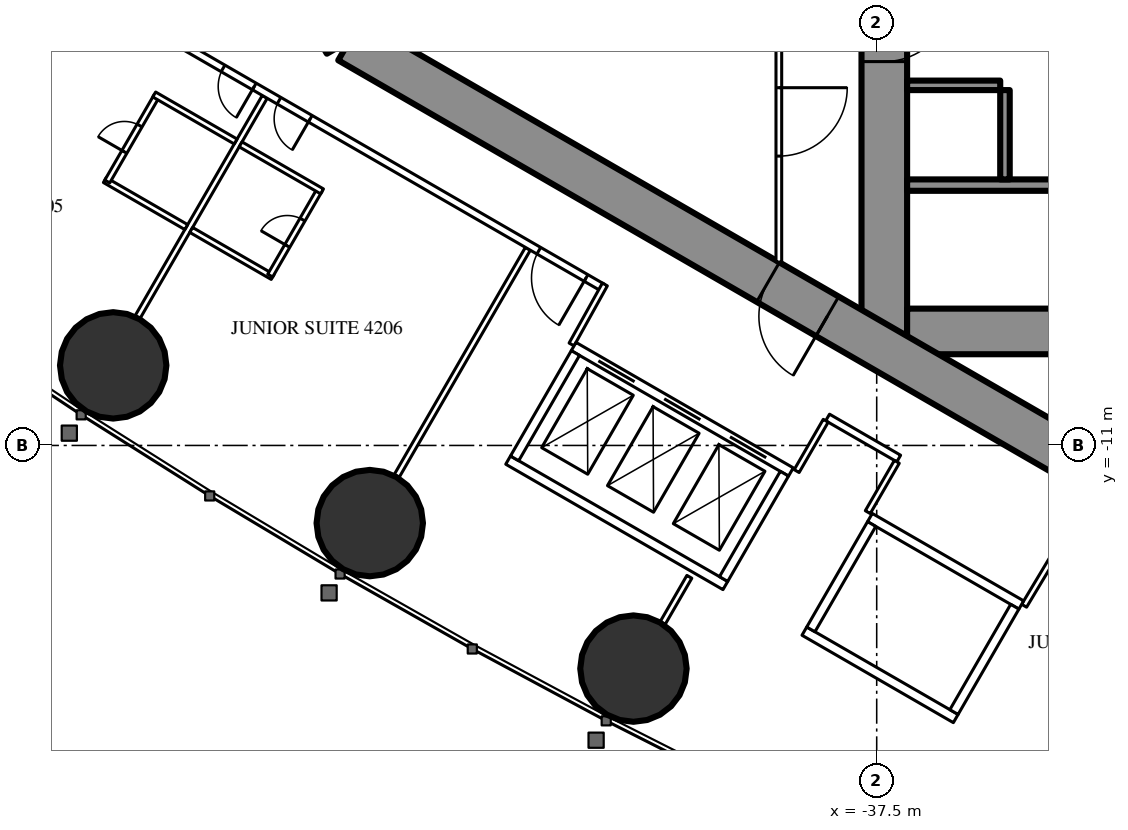
"""IFC4 building model, lengths in metres.
Left out: names, types, materials, properties, quantities, classifications, styles, units other than length and angle.
Written with IfcOpenShell. Run it as: python <this file> out.ifc"""

import sys

from ifc_helpers import new_model, si_unit, direction, frame, frame_2d, origin, origin_2d, place, context, subcontext, project, spatial, rectangle, circle, extrude, element, fill, save


model = new_model("IFC4")
c1 = context("Model", 3, precision=1e-05, world=origin(), true_north=direction((0.0, 1.0)))
c2 = subcontext(c1, "Body", "Model", "MODEL_VIEW")
j1 = project(units=[si_unit("LENGTHUNIT", "METRE"), si_unit("PLANEANGLEUNIT", "RADIAN")], contexts=[c1])
p1 = place(None, origin())
s1 = spatial("IfcSite", under=j1, at=p1, CompositionType="ELEMENT")
p2 = place(p1, origin())
s2 = spatial("IfcBuilding", under=s1, at=p2, CompositionType="ELEMENT")
p3 = place(p2, frame((0.0, 0.0, 159.8)))
s3 = spatial("IfcBuildingStorey", under=s2, at=p3, CompositionType="ELEMENT", Elevation=159.8)
for number, where, z_axis, x_axis in (
    (1, (-57.59, -8.893, 0.0), (0.0, 0.0, 1.0), (1.0, 0.0, 0.0)),
    (2, (-50.839, -13.043, 0.0), (0.0, 0.0, 1.0), (1.0, 0.0, 0.0)),
    (3, (-43.9, -16.871, 0.0), (0.0, 0.0, 1.0), (1.0, 0.0, 0.0)),
):
    element("IfcColumn", number, at=place(p3, frame(where, z_axis=z_axis, x_axis=x_axis)), inside=s3, PredefinedType="COLUMN", context=c2, shape_type="SweptSolid", body=[
        extrude(circle(Radius=1.4, at=origin_2d()), origin(), (0.0, 0.0, 1.0), 3.5),
    ])
p4 = place(p3, frame((-37.3, 8.6, 0.0), z_axis=(0.0, 0.0, 1.0), x_axis=(0.0, -1.0, 0.0)))
e4 = element("IfcWall", 4, at=p4, inside=s3, PredefinedType="SHEAR", context=c2, shape_type="SweptSolid", body=[
    extrude(rectangle(XDim=17.2, YDim=1.2, at=frame_2d((8.6, 0.0))), origin(), (0.0, 0.0, 1.0), 3.5),
])
p5 = place(p4, frame((7.7, 0.0, 0.0)))
e5 = element("IfcOpeningElement", 5, at=p5, cuts=e4, PredefinedType="OPENING", context=c2, shape_type="SweptSolid", body=[
    extrude(rectangle(XDim=1.8, YDim=2.2, at=frame_2d((0.9, 1.1))), frame((0.0, 0.61, 0.0), z_axis=(0.0, -1.0, 0.0), x_axis=(1.0, 0.0, 0.0)), (0.0, 0.0, 1.0), 1.22),
])
p6 = place(p3, frame((-28.3, -8.0, 0.0), z_axis=(0.0, 0.0, 1.0), x_axis=(-1.0, 0.0, 0.0)))
e6 = element("IfcWall", 6, at=p6, inside=s3, PredefinedType="SHEAR", context=c2, shape_type="SweptSolid", body=[
    extrude(rectangle(XDim=8.4, YDim=1.2, at=frame_2d((4.2, 0.0))), origin(), (0.0, 0.0, 1.0), 3.5),
])
p7 = place(p6, frame((0.25, 0.0, 0.0)))
e7 = element("IfcOpeningElement", 7, at=p7, cuts=e6, PredefinedType="OPENING", context=c2, shape_type="SweptSolid", body=[
    extrude(rectangle(XDim=1.0, YDim=2.2, at=frame_2d((0.5, 1.1))), frame((0.0, 0.61, 0.0), z_axis=(0.0, -1.0, 0.0), x_axis=(1.0, 0.0, 0.0)), (0.0, 0.0, 1.0), 1.22),
])
p8 = place(p3, frame((-28.3, -4.15, 0.0), z_axis=(0.0, 0.0, 1.0), x_axis=(-1.0, 0.0, 0.0)))
e8 = element("IfcWall", 8, at=p8, inside=s3, PredefinedType="SHEAR", context=c2, shape_type="SweptSolid", body=[
    extrude(rectangle(XDim=8.4, YDim=0.3, at=frame_2d((4.2, 0.0))), origin(), (0.0, 0.0, 1.0), 3.5),
])
p9 = place(p3, frame((-34.125, -1.65, 0.0), z_axis=(0.0, 0.0, 1.0), x_axis=(0.0, -1.0, 0.0)))
e9 = element("IfcWall", 9, at=p9, inside=s3, PredefinedType="SHEAR", context=c2, shape_type="SweptSolid", body=[
    extrude(rectangle(XDim=2.35, YDim=0.25, at=frame_2d((1.175, 0.0))), origin(), (0.0, 0.0, 1.0), 3.5),
])
p10 = place(p3, frame((-34.25, -1.525, 0.0), z_axis=(0.0, 0.0, 1.0), x_axis=(-1.0, 0.0, 0.0)))
e10 = element("IfcWall", 10, at=p10, inside=s3, PredefinedType="SHEAR", context=c2, shape_type="SweptSolid", body=[
    extrude(rectangle(XDim=2.45, YDim=0.25, at=frame_2d((1.225, 0.0))), origin(), (0.0, 0.0, 1.0), 3.5),
])
p11 = place(p3, frame((-27.2, 14.3, 0.0), z_axis=(0.0, 0.0, 1.0), x_axis=(-0.866026593062, -0.499997940104, 0.0)))
e11 = element("IfcWall", 11, at=p11, inside=s3, PredefinedType="SHEAR", context=c2, shape_type="SweptSolid", body=[
    extrude(rectangle(XDim=28.946, YDim=1.2, at=frame_2d((14.473, 0.0))), origin(), (0.0, 0.0, 1.0), 3.5),
])
p12 = place(p11, frame((4.6, 0.0, 0.0)))
e12 = element("IfcOpeningElement", 12, at=p12, cuts=e11, PredefinedType="OPENING", context=c2, shape_type="SweptSolid", body=[
    extrude(rectangle(XDim=1.0, YDim=2.2, at=frame_2d((0.5, 1.1))), frame((0.0, 0.61, 0.0), z_axis=(0.0, -1.0, 0.0), x_axis=(1.0, 0.0, 0.0)), (0.0, 0.0, 1.0), 1.22),
])
p13 = place(p11, frame((13.395, 0.0, 0.0)))
e13 = element("IfcOpeningElement", 13, at=p13, cuts=e11, PredefinedType="OPENING", context=c2, shape_type="SweptSolid", body=[
    extrude(rectangle(XDim=1.8, YDim=2.2, at=frame_2d((0.9, 1.1))), frame((0.0, 0.61, 0.0), z_axis=(0.0, -1.0, 0.0), x_axis=(1.0, 0.0, 0.0)), (0.0, 0.0, 1.0), 1.22),
])
p14 = place(p3, frame((-27.2, -14.3, 0.0), z_axis=(0.0, 0.0, 1.0), x_axis=(-0.866024021859, 0.500002393557, 0.0)))
e14 = element("IfcWall", 14, at=p14, inside=s3, PredefinedType="SHEAR", context=c2, shape_type="SweptSolid", body=[
    extrude(rectangle(XDim=27.907, YDim=1.2, at=frame_2d((13.954, 0.0))), origin(), (0.0, 0.0, 1.0), 3.5),
])
p15 = place(p14, frame((4.6, 0.0, 0.0)))
e15 = element("IfcOpeningElement", 15, at=p15, cuts=e14, PredefinedType="OPENING", context=c2, shape_type="SweptSolid", body=[
    extrude(rectangle(XDim=1.0, YDim=2.2, at=frame_2d((0.5, 1.1))), frame((0.0, 0.61, 0.0), z_axis=(0.0, -1.0, 0.0), x_axis=(1.0, 0.0, 0.0)), (0.0, 0.0, 1.0), 1.22),
])
p16 = place(p14, frame((13.395, 0.0, 0.0)))
e16 = element("IfcOpeningElement", 16, at=p16, cuts=e14, PredefinedType="OPENING", context=c2, shape_type="SweptSolid", body=[
    extrude(rectangle(XDim=1.8, YDim=2.2, at=frame_2d((0.9, 1.1))), frame((0.0, 0.61, 0.0), z_axis=(0.0, -1.0, 0.0), x_axis=(1.0, 0.0, 0.0)), (0.0, 0.0, 1.0), 1.22),
])
p17 = place(p3, frame((-46.679, -5.825, 0.0), z_axis=(0.0, 0.0, 1.0), x_axis=(-0.500006839597, -0.866021454905, 0.0)))
e17 = element("IfcWall", 17, at=p17, inside=s3, PredefinedType="PARTITIONING", context=c2, shape_type="SweptSolid", body=[
    extrude(rectangle(XDim=6.911, YDim=0.15, at=frame_2d((3.456, 0.0))), origin(), (0.0, 0.0, 1.0), 2.3),
])
p18 = place(p3, frame((-53.602, -1.828, 0.0), z_axis=(0.0, 0.0, 1.0), x_axis=(-0.49999191814, -0.866030069798, 0.0)))
e18 = element("IfcWall", 18, at=p18, inside=s3, PredefinedType="PARTITIONING", context=c2, shape_type="SweptSolid", body=[
    extrude(rectangle(XDim=6.692, YDim=0.15, at=frame_2d((3.346, 0.0))), origin(), (0.0, 0.0, 1.0), 2.3),
])
p19 = place(p3, frame((-42.429, -14.457, 0.0), z_axis=(0.0, 0.0, 1.0), x_axis=(-0.5000578829, -0.865991982497, 0.0)))
e19 = element("IfcWall", 19, at=p19, inside=s3, PredefinedType="PARTITIONING", context=c2, shape_type="SweptSolid", body=[
    extrude(rectangle(XDim=1.407, YDim=0.15, at=frame_2d((0.704, 0.0))), origin(), (0.0, 0.0, 1.0), 3.25),
])
p20 = place(p3, frame((-36.92, -11.344, 0.0), z_axis=(0.0, 0.0, 1.0), x_axis=(-0.866065156741, 0.499931139538, 0.0)))
e20 = element("IfcWall", 20, at=p20, inside=s3, PredefinedType="PARTITIONING", context=c2, shape_type="SweptSolid", body=[
    extrude(rectangle(XDim=2.16, YDim=0.2, at=frame_2d((1.08, 0.0))), origin(), (0.0, 0.0, 1.0), 3.25),
])
p21 = place(p3, frame((-44.715, -6.844, 0.0), z_axis=(0.0, 0.0, 1.0), x_axis=(-0.866025261224, 0.500000246922, 0.0)))
e21 = element("IfcWall", 21, at=p21, inside=s3, PredefinedType="PARTITIONING", context=c2, shape_type="SweptSolid", body=[
    extrude(rectangle(XDim=13.567, YDim=0.2, at=frame_2d((6.783, 0.0))), origin(), (0.0, 0.0, 1.0), 3.25),
])
p22 = place(p21, frame((10.579, 0.0, 0.0)))
e22 = element("IfcOpeningElement", 22, at=p22, cuts=e21, PredefinedType="OPENING", context=c2, shape_type="SweptSolid", body=[
    extrude(rectangle(XDim=0.95, YDim=2.2, at=frame_2d((0.475, 1.1))), frame((0.0, 0.11, 0.0), z_axis=(0.0, -1.0, 0.0), x_axis=(1.0, 0.0, 0.0)), (0.0, 0.0, 1.0), 0.22),
])
p23 = place(p21, frame((8.879, 0.0, 0.0)))
e23 = element("IfcOpeningElement", 23, at=p23, cuts=e21, PredefinedType="OPENING", context=c2, shape_type="SweptSolid", body=[
    extrude(rectangle(XDim=0.95, YDim=2.2, at=frame_2d((0.475, 1.1))), frame((0.0, 0.11, 0.0), z_axis=(0.0, -1.0, 0.0), x_axis=(1.0, 0.0, 0.0)), (0.0, 0.0, 1.0), 0.22),
])
p24 = place(p21, frame((0.5, 0.0, 0.0)))
e24 = element("IfcOpeningElement", 24, at=p24, cuts=e21, PredefinedType="OPENING", context=c2, shape_type="SweptSolid", body=[
    extrude(rectangle(XDim=1.435, YDim=2.2, at=frame_2d((0.718, 1.1))), frame((0.0, 0.11, 0.0), z_axis=(0.0, -1.0, 0.0), x_axis=(1.0, 0.0, 0.0)), (0.0, 0.0, 1.0), 0.22),
])
for number, where, z_axis, x_axis in (
    (25, (-33.621, -15.218, 0.0), (0.0, 0.0, 1.0), (0.514, 0.858, 0.0)),
    (26, (-44.652, -6.764, 0.0), (0.0, 0.0, 1.0), (-0.485, -0.874, 0.0)),
):
    element("IfcWall", number, at=place(p3, frame(where, z_axis=z_axis, x_axis=x_axis)), inside=s3, PredefinedType="PARTITIONING", context=c2, shape_type="SweptSolid", body=[
        extrude(rectangle(XDim=1.805, YDim=0.15, at=frame_2d((0.903, 0.0))), origin(), (0.0, 0.0, 1.0), 3.25),
    ])
p25 = place(p3, frame((-36.97, -11.43, 0.0), z_axis=(0.0, 0.0, 1.0), x_axis=(-0.499985008713, -0.866034058835, 0.0)))
e27 = element("IfcWall", 27, at=p25, inside=s3, PredefinedType="PARTITIONING", context=c2, shape_type="SweptSolid", body=[
    extrude(rectangle(XDim=1.529, YDim=0.15, at=frame_2d((0.765, 0.0))), origin(), (0.0, 0.0, 1.0), 3.25),
])
p26 = place(p3, frame((-38.841, -10.35, 0.0), z_axis=(0.0, 0.0, 1.0), x_axis=(-0.499966498333, -0.866044745117, 0.0)))
e28 = element("IfcWall", 28, at=p26, inside=s3, PredefinedType="PARTITIONING", context=c2, shape_type="SweptSolid", body=[
    extrude(rectangle(XDim=1.53, YDim=0.15, at=frame_2d((0.765, 0.0))), origin(), (0.0, 0.0, 1.0), 3.25),
])
p27 = place(p3, frame((-55.667, -5.255, 0.0), z_axis=(0.0, 0.0, 1.0), x_axis=(-0.866006523861, 0.500032699561, 0.0)))
e29 = element("IfcWall", 29, at=p27, inside=s3, PredefinedType="PARTITIONING", context=c2, shape_type="SweptSolid", body=[
    extrude(rectangle(XDim=2.475, YDim=0.15, at=frame_2d((1.237, 0.0))), origin(), (0.0, 0.0, 1.0), 3.25),
])
p28 = place(p3, frame((-56.446, -1.803, 0.0), z_axis=(0.0, 0.0, 1.0), x_axis=(-0.499936506574, -0.866062058628, 0.0)))
e30 = element("IfcWall", 30, at=p28, inside=s3, PredefinedType="PARTITIONING", context=c2, shape_type="SweptSolid", body=[
    extrude(rectangle(XDim=2.6, YDim=0.15, at=frame_2d((1.3, 0.0))), origin(), (0.0, 0.0, 1.0), 3.25),
])
p29 = place(p28, frame((0.9, 0.0, 0.0)))
e31 = element("IfcOpeningElement", 31, at=p29, cuts=e30, PredefinedType="OPENING", context=c2, shape_type="SweptSolid", body=[
    extrude(rectangle(XDim=0.8, YDim=2.2, at=frame_2d((0.4, 1.1))), frame((0.0, 0.085, 0.0), z_axis=(0.0, -1.0, 0.0), x_axis=(1.0, 0.0, 0.0)), (0.0, 0.0, 1.0), 0.17),
])
for number, where, z_axis, x_axis in (
    (32, (-54.367, -3.003, 0.0), (0.0, 0.0, 1.0), (-0.866, 0.5, 0.0)),
    (33, (-53.394, -6.567, 0.0), (0.0, 0.0, 1.0), (-0.866, 0.5, 0.0)),
):
    element("IfcWall", number, at=place(p3, frame(where, z_axis=z_axis, x_axis=x_axis)), inside=s3, PredefinedType="PARTITIONING", context=c2, shape_type="SweptSolid", body=[
        extrude(rectangle(XDim=2.475, YDim=0.15, at=frame_2d((1.238, 0.0))), origin(), (0.0, 0.0, 1.0), 3.25),
    ])
p30 = place(p3, frame((-52.159, -4.278, 0.0), z_axis=(0.0, 0.0, 1.0), x_axis=(-0.500047596559, -0.865997922154, 0.0)))
e34 = element("IfcWall", 34, at=p30, inside=s3, PredefinedType="PARTITIONING", context=c2, shape_type="SweptSolid", body=[
    extrude(rectangle(XDim=2.6, YDim=0.15, at=frame_2d((1.3, 0.0))), origin(), (0.0, 0.0, 1.0), 3.25),
])
p31 = place(p30, frame((0.9, 0.0, 0.0)))
e35 = element("IfcOpeningElement", 35, at=p31, cuts=e34, PredefinedType="OPENING", context=c2, shape_type="SweptSolid", body=[
    extrude(rectangle(XDim=0.8, YDim=2.2, at=frame_2d((0.4, 1.1))), frame((0.0, 0.085, 0.0), z_axis=(0.0, -1.0, 0.0), x_axis=(1.0, 0.0, 0.0)), (0.0, 0.0, 1.0), 0.17),
])
p32 = place(p3, frame((-52.094, -4.315, 0.0), z_axis=(0.0, 0.0, 1.0), x_axis=(-0.866006523861, 0.500032699561, 0.0)))
e36 = element("IfcWall", 36, at=p32, inside=s3, PredefinedType="PARTITIONING", context=c2, shape_type="SweptSolid", body=[
    extrude(rectangle(XDim=2.475, YDim=0.15, at=frame_2d((1.237, 0.0))), origin(), (0.0, 0.0, 1.0), 2.45),
])
p33 = place(p3, frame((-40.075, 1.2, 0.0), z_axis=(0.0, 0.0, 1.0), x_axis=(0.0, -1.0, 0.0)))
e37 = element("IfcWall", 37, at=p33, inside=s3, PredefinedType="PARTITIONING", context=c2, shape_type="SweptSolid", body=[
    extrude(rectangle(XDim=7.374, YDim=0.15, at=frame_2d((3.687, 0.0))), origin(), (0.0, 0.0, 1.0), 3.25),
])
p34 = place(p33, frame((2.787, 0.0, 0.0)))
e38 = element("IfcOpeningElement", 38, at=p34, cuts=e37, PredefinedType="OPENING", context=c2, shape_type="SweptSolid", body=[
    extrude(rectangle(XDim=1.8, YDim=2.2, at=frame_2d((0.9, 1.1))), frame((0.0, 0.085, 0.0), z_axis=(0.0, -1.0, 0.0), x_axis=(1.0, 0.0, 0.0)), (0.0, 0.0, 1.0), 0.17),
])
p35 = place(p3, frame((-33.696, -15.197, 0.0), z_axis=(0.0, 0.0, 1.0), x_axis=(-0.865976953817, 0.500083908417, 0.0)))
e39 = element("IfcWall", 39, at=p35, inside=s3, PredefinedType="PARTITIONING", context=c2, shape_type="SweptSolid", body=[
    extrude(rectangle(XDim=4.599, YDim=0.25, at=frame_2d((2.3, 0.0))), origin(), (0.0, 0.0, 1.0), 3.25),
])
p36 = place(p3, frame((-35.42, -18.186, 0.0), z_axis=(0.0, 0.0, 1.0), x_axis=(-0.865990227814, 0.50006092162, 0.0)))
e40 = element("IfcWall", 40, at=p36, inside=s3, PredefinedType="PARTITIONING", context=c2, shape_type="SweptSolid", body=[
    extrude(rectangle(XDim=4.6, YDim=0.25, at=frame_2d((2.3, 0.0))), origin(), (0.0, 0.0, 1.0), 3.25),
])
p37 = place(p3, frame((-33.866, -15.243, 0.0), z_axis=(0.0, 0.0, 1.0), x_axis=(-0.499929347863, -0.866066190972, 0.0)))
e41 = element("IfcWall", 41, at=p37, inside=s3, PredefinedType="PARTITIONING", context=c2, shape_type="SweptSolid", body=[
    extrude(rectangle(XDim=3.201, YDim=0.25, at=frame_2d((1.6, 0.0))), origin(), (0.0, 0.0, 1.0), 3.25),
])
p38 = place(p3, frame((-37.633, -13.068, 0.0), z_axis=(0.0, 0.0, 1.0), x_axis=(-0.499872130319, -0.866099216793, 0.0)))
e42 = element("IfcWall", 42, at=p38, inside=s3, PredefinedType="PARTITIONING", context=c2, shape_type="SweptSolid", body=[
    extrude(rectangle(XDim=3.2, YDim=0.25, at=frame_2d((1.6, 0.0))), origin(), (0.0, 0.0, 1.0), 3.25),
])
p39 = place(p3, frame((-39.758, -11.697, 0.0), z_axis=(0.0, 0.0, 1.0), x_axis=(-0.866024194504, 0.500002094529, 0.0)))
e43 = element("IfcWall", 43, at=p39, inside=s3, PredefinedType="PARTITIONING", context=c2, shape_type="SweptSolid", body=[
    extrude(rectangle(XDim=6.6, YDim=0.25, at=frame_2d((3.3, 0.0))), origin(), (0.0, 0.0, 1.0), 3.25),
])
p40 = place(p39, frame((0.75, 0.0, 0.0)))
e44 = element("IfcOpeningElement", 44, at=p40, cuts=e43, PredefinedType="OPENING", context=c2, shape_type="SweptSolid", body=[
    extrude(rectangle(XDim=1.1, YDim=2.2, at=frame_2d((0.55, 1.1))), frame((0.0, 0.135, 0.0), z_axis=(0.0, -1.0, 0.0), x_axis=(1.0, 0.0, 0.0)), (0.0, 0.0, 1.0), 0.27),
])
p41 = place(p39, frame((2.75, 0.0, 0.0)))
e45 = element("IfcOpeningElement", 45, at=p41, cuts=e43, PredefinedType="OPENING", context=c2, shape_type="SweptSolid", body=[
    extrude(rectangle(XDim=1.1, YDim=2.2, at=frame_2d((0.55, 1.1))), frame((0.0, 0.135, 0.0), z_axis=(0.0, -1.0, 0.0), x_axis=(1.0, 0.0, 0.0)), (0.0, 0.0, 1.0), 0.27),
])
p42 = place(p39, frame((4.75, 0.0, 0.0)))
e46 = element("IfcOpeningElement", 46, at=p42, cuts=e43, PredefinedType="OPENING", context=c2, shape_type="SweptSolid", body=[
    extrude(rectangle(XDim=1.1, YDim=2.2, at=frame_2d((0.55, 1.1))), frame((0.0, 0.135, 0.0), z_axis=(0.0, -1.0, 0.0), x_axis=(1.0, 0.0, 0.0)), (0.0, 0.0, 1.0), 0.27),
])
p43 = place(p3, frame((-41.482, -14.686, 0.0), z_axis=(0.0, 0.0, 1.0), x_axis=(-0.86603344179, 0.499986077507, 0.0)))
e47 = element("IfcWall", 47, at=p43, inside=s3, PredefinedType="PARTITIONING", context=c2, shape_type="SweptSolid", body=[
    extrude(rectangle(XDim=6.6, YDim=0.25, at=frame_2d((3.3, 0.0))), origin(), (0.0, 0.0, 1.0), 3.25),
])
for number, where, z_axis, x_axis in (
    (48, (-39.928, -11.743, 0.0), (0.0, 0.0, 1.0), (-0.5, -0.866, 0.0)),
    (49, (-45.428, -8.568, 0.0), (0.0, 0.0, 1.0), (-0.5, -0.866, 0.0)),
):
    element("IfcWall", number, at=place(p3, frame(where, z_axis=z_axis, x_axis=x_axis)), inside=s3, PredefinedType="PARTITIONING", context=c2, shape_type="SweptSolid", body=[
        extrude(rectangle(XDim=3.201, YDim=0.25, at=frame_2d((1.6, 0.0))), origin(), (0.0, 0.0, 1.0), 3.25),
    ])
p44 = place(p29, origin())
e50 = element("IfcDoor", 50, at=p44, inside=s3, OperationType="SINGLE_SWING_RIGHT", PredefinedType="DOOR", context=c2, shape_type="SweptSolid", body=[
    extrude(rectangle(XDim=0.8, YDim=2.2, at=frame_2d((0.4, 1.1))), frame((0.0, 0.025, 0.0), z_axis=(0.0, -1.0, 0.0), x_axis=(1.0, 0.0, 0.0)), (0.0, 0.0, 1.0), 0.05),
])
fill(e31, e50)
p45 = place(p22, origin())
e51 = element("IfcDoor", 51, at=p45, inside=s3, OperationType="SINGLE_SWING_LEFT", PredefinedType="DOOR", context=c2, shape_type="SweptSolid", body=[
    extrude(rectangle(XDim=0.95, YDim=2.2, at=frame_2d((0.475, 1.1))), frame((0.0, 0.025, 0.0), z_axis=(0.0, -1.0, 0.0), x_axis=(1.0, 0.0, 0.0)), (0.0, 0.0, 1.0), 0.05),
])
fill(e22, e51)
p46 = place(p31, origin())
e52 = element("IfcDoor", 52, at=p46, inside=s3, OperationType="SINGLE_SWING_RIGHT", PredefinedType="DOOR", context=c2, shape_type="SweptSolid", body=[
    extrude(rectangle(XDim=0.8, YDim=2.2, at=frame_2d((0.4, 1.1))), frame((0.0, 0.025, 0.0), z_axis=(0.0, -1.0, 0.0), x_axis=(1.0, 0.0, 0.0)), (0.0, 0.0, 1.0), 0.05),
])
fill(e35, e52)
p47 = place(p23, origin())
e53 = element("IfcDoor", 53, at=p47, inside=s3, OperationType="SINGLE_SWING_LEFT", PredefinedType="DOOR", context=c2, shape_type="SweptSolid", body=[
    extrude(rectangle(XDim=0.95, YDim=2.2, at=frame_2d((0.475, 1.1))), frame((0.0, 0.025, 0.0), z_axis=(0.0, -1.0, 0.0), x_axis=(1.0, 0.0, 0.0)), (0.0, 0.0, 1.0), 0.05),
])
fill(e23, e53)
p48 = place(p24, origin())
e54 = element("IfcDoor", 54, at=p48, inside=s3, OperationType="SINGLE_SWING_LEFT", PredefinedType="DOOR", context=c2, shape_type="SweptSolid", body=[
    extrude(rectangle(XDim=1.435, YDim=2.2, at=frame_2d((0.718, 1.1))), frame((0.0, 0.025, 0.0), z_axis=(0.0, -1.0, 0.0), x_axis=(1.0, 0.0, 0.0)), (0.0, 0.0, 1.0), 0.05),
])
fill(e24, e54)
p49 = place(p34, origin())
e55 = element("IfcDoor", 55, at=p49, inside=s3, OperationType="DOUBLE_DOOR_SINGLE_SWING", PredefinedType="DOOR", context=c2, shape_type="SweptSolid", body=[
    extrude(rectangle(XDim=1.8, YDim=2.2, at=frame_2d((0.9, 1.1))), frame((0.0, 0.025, 0.0), z_axis=(0.0, -1.0, 0.0), x_axis=(1.0, 0.0, 0.0)), (0.0, 0.0, 1.0), 0.05),
])
fill(e38, e55)
p50 = place(p16, origin())
e56 = element("IfcDoor", 56, at=p50, inside=s3, OperationType="DOUBLE_DOOR_SINGLE_SWING", PredefinedType="DOOR", context=c2, shape_type="SweptSolid", body=[
    extrude(rectangle(XDim=1.8, YDim=2.2, at=frame_2d((0.9, 1.1))), frame((0.0, 0.025, 0.0), z_axis=(0.0, -1.0, 0.0), x_axis=(1.0, 0.0, 0.0)), (0.0, 0.0, 1.0), 0.05),
])
fill(e16, e56)
p51 = place(p5, origin())
e57 = element("IfcDoor", 57, at=p51, inside=s3, OperationType="DOUBLE_DOOR_SINGLE_SWING", PredefinedType="DOOR", context=c2, shape_type="SweptSolid", body=[
    extrude(rectangle(XDim=1.8, YDim=2.2, at=frame_2d((0.9, 1.1))), frame((0.0, 0.025, 0.0), z_axis=(0.0, -1.0, 0.0), x_axis=(1.0, 0.0, 0.0)), (0.0, 0.0, 1.0), 0.05),
])
fill(e5, e57)
p52 = place(p40, origin())
e58 = element("IfcDoor", 58, at=p52, inside=s3, OperationType="DOUBLE_DOOR_SLIDING", PredefinedType="USERDEFINED", context=c2, shape_type="SweptSolid", body=[
    extrude(rectangle(XDim=1.1, YDim=2.2, at=frame_2d((0.55, 1.1))), frame((0.0, 0.025, 0.0), z_axis=(0.0, -1.0, 0.0), x_axis=(1.0, 0.0, 0.0)), (0.0, 0.0, 1.0), 0.05),
])
fill(e44, e58)
p53 = place(p41, origin())
e59 = element("IfcDoor", 59, at=p53, inside=s3, OperationType="DOUBLE_DOOR_SLIDING", PredefinedType="USERDEFINED", context=c2, shape_type="SweptSolid", body=[
    extrude(rectangle(XDim=1.1, YDim=2.2, at=frame_2d((0.55, 1.1))), frame((0.0, 0.025, 0.0), z_axis=(0.0, -1.0, 0.0), x_axis=(1.0, 0.0, 0.0)), (0.0, 0.0, 1.0), 0.05),
])
fill(e45, e59)
p54 = place(p42, origin())
e60 = element("IfcDoor", 60, at=p54, inside=s3, OperationType="DOUBLE_DOOR_SLIDING", PredefinedType="USERDEFINED", context=c2, shape_type="SweptSolid", body=[
    extrude(rectangle(XDim=1.1, YDim=2.2, at=frame_2d((0.55, 1.1))), frame((0.0, 0.025, 0.0), z_axis=(0.0, -1.0, 0.0), x_axis=(1.0, 0.0, 0.0)), (0.0, 0.0, 1.0), 0.05),
])
fill(e46, e60)
save(model, sys.argv[1])
